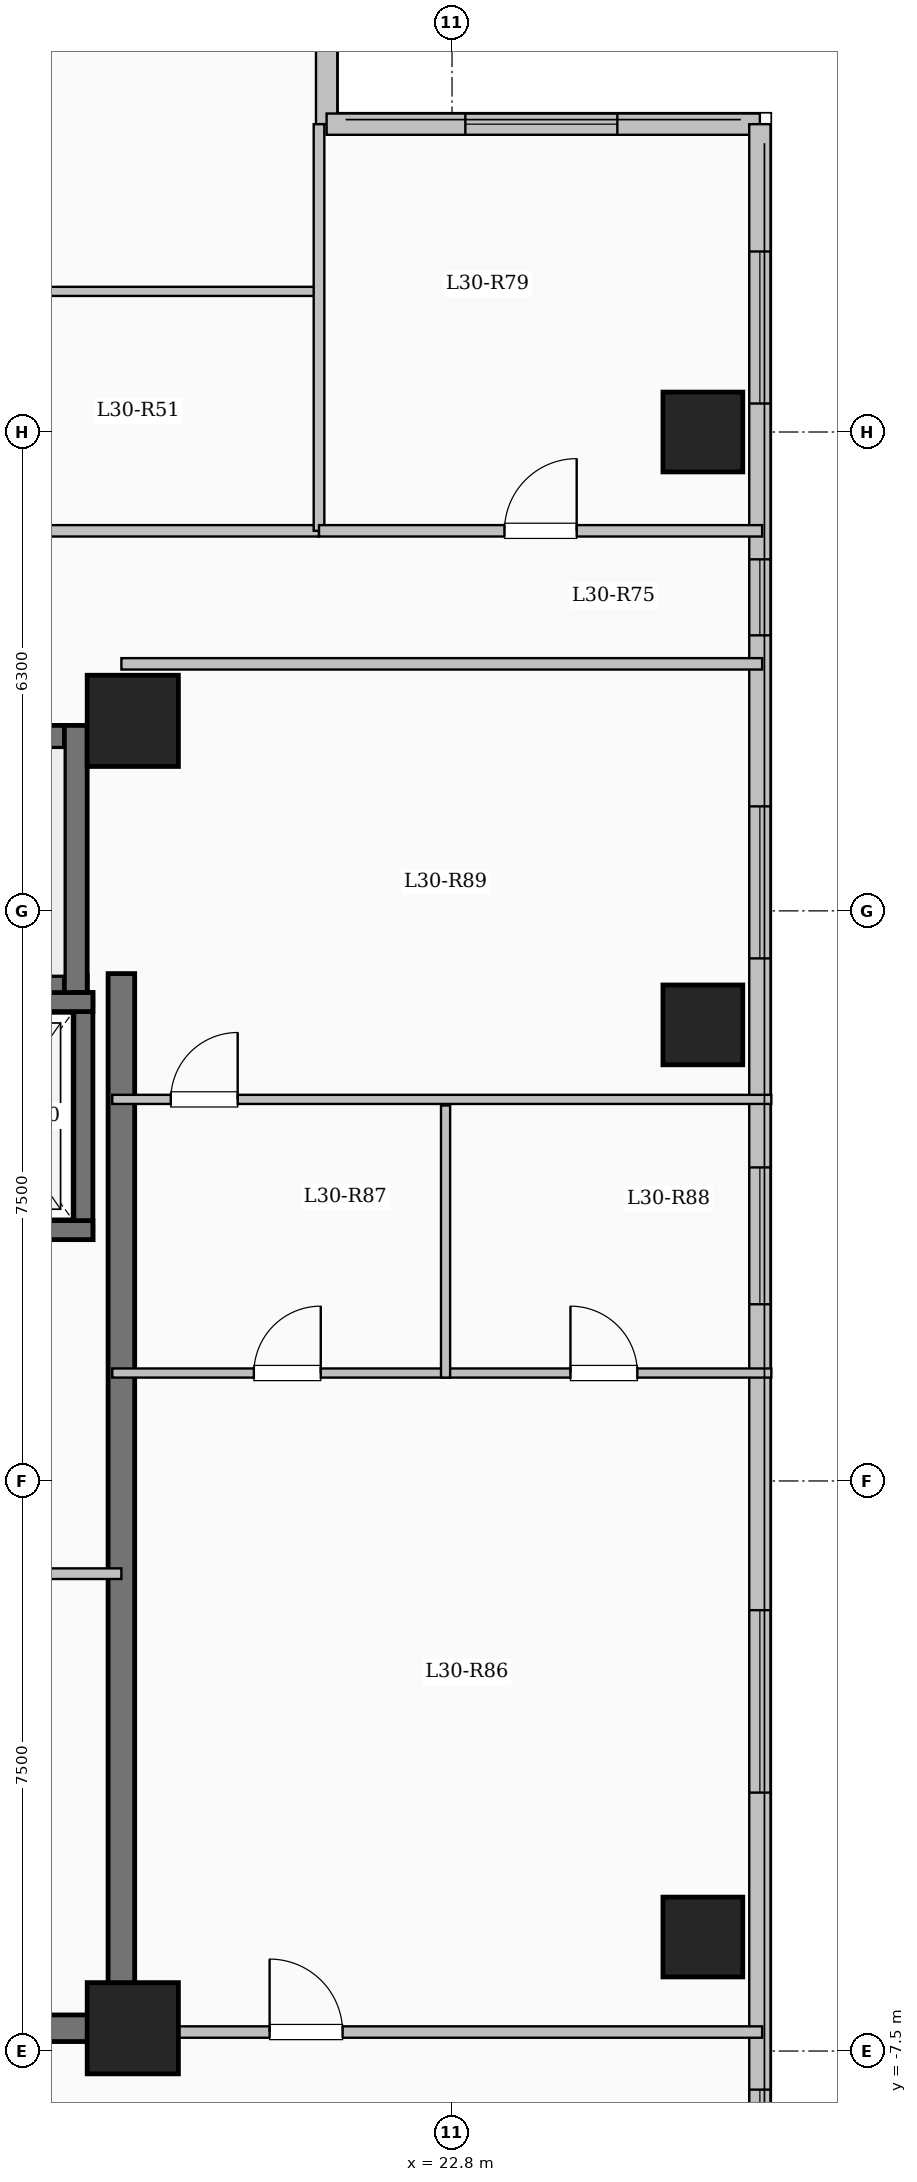
"""IFC4 building model, lengths in metres.
Left out: names, types, materials, properties, quantities, classifications, styles, units other than length and angle.
Written with IfcOpenShell. Run it as: python <this file> out.ifc"""

import sys

from ifc_helpers import new_model, si_unit, direction, frame, frame_2d, origin, origin_2d, place, context, subcontext, project, spatial, rectangle, extrude, element, fill, save


model = new_model("IFC4")
c1 = context("Model", 3, precision=1e-05, world=origin(), true_north=direction((0.0, 1.0)))
c2 = subcontext(c1, "Body", "Model", "MODEL_VIEW")
j1 = project(units=[si_unit("LENGTHUNIT", "METRE"), si_unit("PLANEANGLEUNIT", "RADIAN")], contexts=[c1])
p1 = place(None, origin())
s1 = spatial("IfcSite", under=j1, at=p1, CompositionType="ELEMENT")
p2 = place(p1, origin())
s2 = spatial("IfcBuilding", under=s1, at=p2, CompositionType="ELEMENT")
p3 = place(p2, frame((0.0, 0.0, 111.8)))
s3 = spatial("IfcBuildingStorey", under=s2, at=p3, CompositionType="ELEMENT", Elevation=111.8)
for number, where, z_axis, x_axis in (
    (1, (18.6, -7.2, 0.0), (0.0, 0.0, 1.0), (1.0, 0.0, 0.0)),
    (2, (18.6, 10.0, 0.0), (0.0, 0.0, 1.0), (1.0, 0.0, 0.0)),
):
    element("IfcColumn", number, at=place(p3, frame(where, z_axis=z_axis, x_axis=x_axis)), inside=s3, PredefinedType="COLUMN", context=c2, shape_type="SweptSolid", body=[
        extrude(rectangle(XDim=1.2, YDim=1.2, at=origin_2d()), origin(), (0.0, 0.0, 1.0), 3.35),
    ])
for number, where, z_axis, x_axis in (
    (3, (26.1, -6.0, 0.0), (0.0, 0.0, 1.0), (1.0, 0.0, 0.0)),
    (4, (26.1, 6.0, 0.0), (0.0, 0.0, 1.0), (1.0, 0.0, 0.0)),
    (5, (26.1, 13.8, 0.0), (0.0, 0.0, 1.0), (1.0, 0.0, 0.0)),
):
    element("IfcColumn", number, at=place(p3, frame(where, z_axis=z_axis, x_axis=x_axis)), inside=s3, PredefinedType="COLUMN", context=c2, shape_type="SweptSolid", body=[
        extrude(rectangle(XDim=1.05, YDim=1.05, at=origin_2d()), origin(), (0.0, 0.0, 1.0), 3.35),
    ])
p4 = place(p3, frame((21.15, 22.05, 0.0), z_axis=(0.0, 0.0, 1.0), x_axis=(0.0, -1.0, 0.0)))
e6 = element("IfcWall", 6, at=p4, inside=s3, PredefinedType="SOLIDWALL", context=c2, shape_type="SweptSolid", body=[
    extrude(rectangle(XDim=4.2, YDim=0.28, at=frame_2d((2.1, 0.0))), origin(), (0.0, 0.0, 1.0), 3.1),
])
p5 = place(p4, frame((1.218, 0.0, 0.9)))
e7 = element("IfcOpeningElement", 7, at=p5, cuts=e6, PredefinedType="OPENING", context=c2, shape_type="SweptSolid", body=[
    extrude(rectangle(XDim=1.8, YDim=1.65, at=frame_2d((0.9, 0.825))), frame((0.0, 0.15, 0.0), z_axis=(0.0, -1.0, 0.0), x_axis=(1.0, 0.0, 0.0)), (0.0, 0.0, 1.0), 0.3),
])
p6 = place(p3, frame((21.15, 17.85, 0.0), z_axis=(0.0, 0.0, 1.0), x_axis=(1.0, 0.0, 0.0)))
e8 = element("IfcWall", 8, at=p6, inside=s3, PredefinedType="SOLIDWALL", context=c2, shape_type="SweptSolid", body=[
    extrude(rectangle(XDim=5.7, YDim=0.28, at=frame_2d((2.85, 0.0))), origin(), (0.0, 0.0, 1.0), 3.1),
])
p7 = place(p6, frame((1.825, 0.0, 0.9)))
e9 = element("IfcOpeningElement", 9, at=p7, cuts=e8, PredefinedType="OPENING", context=c2, shape_type="SweptSolid", body=[
    extrude(rectangle(XDim=2.0, YDim=1.7, at=frame_2d((1.0, 0.85))), frame((0.0, 0.15, 0.0), z_axis=(0.0, -1.0, 0.0), x_axis=(1.0, 0.0, 0.0)), (0.0, 0.0, 1.0), 0.3),
])
p8 = place(p3, frame((26.85, 17.85, 0.0), z_axis=(0.0, 0.0, 1.0), x_axis=(0.0, -1.0, 0.0)))
e10 = element("IfcWall", 10, at=p8, inside=s3, PredefinedType="SOLIDWALL", context=c2, shape_type="SweptSolid", body=[
    extrude(rectangle(XDim=35.7, YDim=0.28, at=frame_2d((17.85, 0.0))), origin(), (0.0, 0.0, 1.0), 3.1),
])
p9 = place(p8, frame((1.675, 0.0, 0.9)))
e11 = element("IfcOpeningElement", 11, at=p9, cuts=e10, PredefinedType="OPENING", context=c2, shape_type="SweptSolid", body=[
    extrude(rectangle(XDim=2.0, YDim=1.7, at=frame_2d((1.0, 0.85))), frame((0.0, 0.15, 0.0), z_axis=(0.0, -1.0, 0.0), x_axis=(1.0, 0.0, 0.0)), (0.0, 0.0, 1.0), 0.3),
])
p10 = place(p8, frame((5.725, 0.0, 0.95)))
e12 = element("IfcOpeningElement", 12, at=p10, cuts=e10, PredefinedType="OPENING", context=c2, shape_type="SweptSolid", body=[
    extrude(rectangle(XDim=1.0, YDim=1.5, at=frame_2d((0.5, 0.75))), frame((0.0, 0.15, 0.0), z_axis=(0.0, -1.0, 0.0), x_axis=(1.0, 0.0, 0.0)), (0.0, 0.0, 1.0), 0.3),
])
p11 = place(p8, frame((8.975, 0.0, 0.9)))
e13 = element("IfcOpeningElement", 13, at=p11, cuts=e10, PredefinedType="OPENING", context=c2, shape_type="SweptSolid", body=[
    extrude(rectangle(XDim=2.0, YDim=1.7, at=frame_2d((1.0, 0.85))), frame((0.0, 0.15, 0.0), z_axis=(0.0, -1.0, 0.0), x_axis=(1.0, 0.0, 0.0)), (0.0, 0.0, 1.0), 0.3),
])
p12 = place(p8, frame((13.725, 0.0, 0.9)))
e14 = element("IfcOpeningElement", 14, at=p12, cuts=e10, PredefinedType="OPENING", context=c2, shape_type="SweptSolid", body=[
    extrude(rectangle(XDim=1.8, YDim=1.65, at=frame_2d((0.9, 0.825))), frame((0.0, 0.15, 0.0), z_axis=(0.0, -1.0, 0.0), x_axis=(1.0, 0.0, 0.0)), (0.0, 0.0, 1.0), 0.3),
])
p13 = place(p8, frame((19.55, 0.0, 0.9)))
e15 = element("IfcOpeningElement", 15, at=p13, cuts=e10, PredefinedType="OPENING", context=c2, shape_type="SweptSolid", body=[
    extrude(rectangle(XDim=2.4, YDim=1.8, at=frame_2d((1.2, 0.9))), frame((0.0, 0.15, 0.0), z_axis=(0.0, -1.0, 0.0), x_axis=(1.0, 0.0, 0.0)), (0.0, 0.0, 1.0), 0.3),
])
p14 = place(p8, frame((25.857, 0.0, 0.9)))
e16 = element("IfcOpeningElement", 16, at=p14, cuts=e10, PredefinedType="OPENING", context=c2, shape_type="SweptSolid", body=[
    extrude(rectangle(XDim=1.5, YDim=1.65, at=frame_2d((0.75, 0.825))), frame((0.0, 0.15, 0.0), z_axis=(0.0, -1.0, 0.0), x_axis=(1.0, 0.0, 0.0)), (0.0, 0.0, 1.0), 0.3),
])
p15 = place(p8, frame((30.75, 0.0, 0.9)))
e17 = element("IfcOpeningElement", 17, at=p15, cuts=e10, PredefinedType="OPENING", context=c2, shape_type="SweptSolid", body=[
    extrude(rectangle(XDim=2.4, YDim=1.8, at=frame_2d((1.2, 0.9))), frame((0.0, 0.15, 0.0), z_axis=(0.0, -1.0, 0.0), x_axis=(1.0, 0.0, 0.0)), (0.0, 0.0, 1.0), 0.3),
])
p16 = place(p3, frame((10.0, 9.79, 0.0), z_axis=(0.0, 0.0, 1.0), x_axis=(1.0, 0.0, 0.0)))
e18 = element("IfcWall", 18, at=p16, inside=s3, PredefinedType="SHEAR", context=c2, shape_type="SweptSolid", body=[
    extrude(rectangle(XDim=8.0, YDim=0.3, at=frame_2d((4.0, 0.0))), origin(), (0.0, 0.0, 1.0), 3.35),
])
p17 = place(p3, frame((10.0, 6.5, 0.0), z_axis=(0.0, 0.0, 1.0), x_axis=(1.0, 0.0, 0.0)))
e19 = element("IfcWall", 19, at=p17, inside=s3, PredefinedType="SHEAR", context=c2, shape_type="SweptSolid", body=[
    extrude(rectangle(XDim=8.0, YDim=0.3, at=frame_2d((4.0, 0.0))), origin(), (0.0, 0.0, 1.0), 3.35),
])
p18 = place(p17, frame((0.55, 0.0, 0.0)))
e20 = element("IfcOpeningElement", 20, at=p18, cuts=e19, PredefinedType="OPENING", context=c2, shape_type="SweptSolid", body=[
    extrude(rectangle(XDim=1.0, YDim=2.15, at=frame_2d((0.5, 1.075))), frame((0.0, 0.16, 0.0), z_axis=(0.0, -1.0, 0.0), x_axis=(1.0, 0.0, 0.0)), (0.0, 0.0, 1.0), 0.32),
])
p19 = place(p3, frame((17.85, 6.35, 0.0), z_axis=(0.0, 0.0, 1.0), x_axis=(0.0, 1.0, 0.0)))
e21 = element("IfcWall", 21, at=p19, inside=s3, PredefinedType="SHEAR", context=c2, shape_type="SweptSolid", body=[
    extrude(rectangle(XDim=3.59, YDim=0.3, at=frame_2d((1.795, 0.0))), origin(), (0.0, 0.0, 1.0), 3.35),
])
p20 = place(p3, frame((17.95, 3.175, 0.0), z_axis=(0.0, 0.0, 1.0), x_axis=(0.0, 1.0, 0.0)))
e22 = element("IfcWall", 22, at=p20, inside=s3, PredefinedType="SHEAR", context=c2, shape_type="SweptSolid", body=[
    extrude(rectangle(XDim=3.25, YDim=0.25, at=frame_2d((1.625, 0.0))), origin(), (0.0, 0.0, 1.0), 3.35),
])
for number, where, z_axis, x_axis in (
    (23, (15.525, 3.3, 0.0), (0.0, 0.0, 1.0), (1.0, 0.0, 0.0)),
    (24, (15.525, 6.3, 0.0), (0.0, 0.0, 1.0), (1.0, 0.0, 0.0)),
):
    element("IfcWall", number, at=place(p3, frame(where, z_axis=z_axis, x_axis=x_axis)), inside=s3, PredefinedType="SHEAR", context=c2, shape_type="SweptSolid", body=[
        extrude(rectangle(XDim=2.55, YDim=0.25, at=frame_2d((1.275, 0.0))), origin(), (0.0, 0.0, 1.0), 3.35),
    ])
p21 = place(p3, frame((18.45, -7.375, 0.0), z_axis=(0.0, 0.0, 1.0), x_axis=(0.0, 1.0, 0.0)))
e25 = element("IfcWall", 25, at=p21, inside=s3, PredefinedType="SHEAR", context=c2, shape_type="SweptSolid", body=[
    extrude(rectangle(XDim=14.05, YDim=0.35, at=frame_2d((7.025, 0.0))), origin(), (0.0, 0.0, 1.0), 3.35),
])
p22 = place(p3, frame((10.075, -7.2, 0.0), z_axis=(0.0, 0.0, 1.0), x_axis=(1.0, 0.0, 0.0)))
e26 = element("IfcWall", 26, at=p22, inside=s3, PredefinedType="SHEAR", context=c2, shape_type="SweptSolid", body=[
    extrude(rectangle(XDim=8.55, YDim=0.35, at=frame_2d((4.275, 0.0))), origin(), (0.0, 0.0, 1.0), 3.35),
])
p23 = place(p3, frame((15.4, -1.22, 0.0), z_axis=(0.0, 0.0, 1.0), x_axis=(1.0, 0.0, 0.0)))
e27 = element("IfcWall", 27, at=p23, inside=s3, PredefinedType="PARTITIONING", context=c2, shape_type="SweptSolid", body=[
    extrude(rectangle(XDim=3.05, YDim=0.14, at=frame_2d((1.525, 0.0))), origin(), (0.0, 0.0, 1.0), 3.1),
])
p24 = place(p23, frame((1.05, 0.0, 0.0)))
e28 = element("IfcOpeningElement", 28, at=p24, cuts=e27, PredefinedType="OPENING", context=c2, shape_type="SweptSolid", body=[
    extrude(rectangle(XDim=0.9, YDim=2.08, at=frame_2d((0.45, 1.04))), frame((0.0, 0.08, 0.0), z_axis=(0.0, -1.0, 0.0), x_axis=(1.0, 0.0, 0.0)), (0.0, 0.0, 1.0), 0.16),
])
p25 = place(p3, frame((3.85, 12.5, 0.0), z_axis=(0.0, 0.0, 1.0), x_axis=(1.0, 0.0, 0.0)))
e29 = element("IfcWall", 29, at=p25, inside=s3, PredefinedType="PARTITIONING", context=c2, shape_type="SweptSolid", body=[
    extrude(rectangle(XDim=17.2, YDim=0.15, at=frame_2d((8.6, 0.0))), origin(), (0.0, 0.0, 1.0), 3.1),
])
p26 = place(p25, frame((1.3, 0.0, 0.0)))
e30 = element("IfcOpeningElement", 30, at=p26, cuts=e29, PredefinedType="OPENING", context=c2, shape_type="SweptSolid", body=[
    extrude(rectangle(XDim=0.96, YDim=2.15, at=frame_2d((0.48, 1.075))), frame((0.0, 0.085, 0.0), z_axis=(0.0, -1.0, 0.0), x_axis=(1.0, 0.0, 0.0)), (0.0, 0.0, 1.0), 0.17),
])
p27 = place(p25, frame((8.06, 0.0, 0.0)))
e31 = element("IfcOpeningElement", 31, at=p27, cuts=e29, PredefinedType="OPENING", context=c2, shape_type="SweptSolid", body=[
    extrude(rectangle(XDim=0.96, YDim=2.15, at=frame_2d((0.48, 1.075))), frame((0.0, 0.085, 0.0), z_axis=(0.0, -1.0, 0.0), x_axis=(1.0, 0.0, 0.0)), (0.0, 0.0, 1.0), 0.17),
])
p28 = place(p3, frame((16.23, 15.65, 0.0), z_axis=(0.0, 0.0, 1.0), x_axis=(1.0, 0.0, 0.0)))
e32 = element("IfcWall", 32, at=p28, inside=s3, PredefinedType="PARTITIONING", context=c2, shape_type="SweptSolid", body=[
    extrude(rectangle(XDim=4.88, YDim=0.12, at=frame_2d((2.44, 0.0))), origin(), (0.0, 0.0, 1.0), 3.1),
])
p29 = place(p3, frame((18.45, -7.25, 0.0), z_axis=(0.0, 0.0, 1.0), x_axis=(1.0, 0.0, 0.0)))
e33 = element("IfcWall", 33, at=p29, inside=s3, PredefinedType="PARTITIONING", context=c2, shape_type="SweptSolid", body=[
    extrude(rectangle(XDim=8.43, YDim=0.15, at=frame_2d((4.215, 0.0))), origin(), (0.0, 0.0, 1.0), 3.1),
])
p30 = place(p29, frame((1.95, 0.0, 0.0)))
e34 = element("IfcOpeningElement", 34, at=p30, cuts=e33, PredefinedType="OPENING", context=c2, shape_type="SweptSolid", body=[
    extrude(rectangle(XDim=0.96, YDim=2.15, at=frame_2d((0.48, 1.075))), frame((0.0, 0.085, 0.0), z_axis=(0.0, -1.0, 0.0), x_axis=(1.0, 0.0, 0.0)), (0.0, 0.0, 1.0), 0.17),
])
p31 = place(p3, frame((18.45, 10.75, 0.0), z_axis=(0.0, 0.0, 1.0), x_axis=(1.0, 0.0, 0.0)))
e35 = element("IfcWall", 35, at=p31, inside=s3, PredefinedType="PARTITIONING", context=c2, shape_type="SweptSolid", body=[
    extrude(rectangle(XDim=8.43, YDim=0.15, at=frame_2d((4.215, 0.0))), origin(), (0.0, 0.0, 1.0), 3.1),
])
p32 = place(p3, frame((21.05, 12.5, 0.0), z_axis=(0.0, 0.0, 1.0), x_axis=(0.0, 1.0, 0.0)))
e36 = element("IfcWall", 36, at=p32, inside=s3, PredefinedType="PARTITIONING", context=c2, shape_type="SweptSolid", body=[
    extrude(rectangle(XDim=5.35, YDim=0.14, at=frame_2d((2.675, 0.0))), origin(), (0.0, 0.0, 1.0), 3.1),
])
p33 = place(p3, frame((21.05, 12.5, 0.0), z_axis=(0.0, 0.0, 1.0), x_axis=(1.0, 0.0, 0.0)))
e37 = element("IfcWall", 37, at=p33, inside=s3, PredefinedType="PARTITIONING", context=c2, shape_type="SweptSolid", body=[
    extrude(rectangle(XDim=5.83, YDim=0.15, at=frame_2d((2.915, 0.0))), origin(), (0.0, 0.0, 1.0), 3.1),
])
p34 = place(p33, frame((2.44, 0.0, 0.0)))
e38 = element("IfcOpeningElement", 38, at=p34, cuts=e37, PredefinedType="OPENING", context=c2, shape_type="SweptSolid", body=[
    extrude(rectangle(XDim=0.95, YDim=2.15, at=frame_2d((0.475, 1.075))), frame((0.0, 0.085, 0.0), z_axis=(0.0, -1.0, 0.0), x_axis=(1.0, 0.0, 0.0)), (0.0, 0.0, 1.0), 0.17),
])
p35 = place(p3, frame((18.33, 1.42, 0.0), z_axis=(0.0, 0.0, 1.0), x_axis=(1.0, 0.0, 0.0)))
e39 = element("IfcWall", 39, at=p35, inside=s3, PredefinedType="PARTITIONING", context=c2, shape_type="SweptSolid", body=[
    extrude(rectangle(XDim=8.67, YDim=0.12, at=frame_2d((4.335, 0.0))), origin(), (0.0, 0.0, 1.0), 3.1),
])
p36 = place(p35, frame((1.863, 0.0, 0.0)))
e40 = element("IfcOpeningElement", 40, at=p36, cuts=e39, PredefinedType="OPENING", context=c2, shape_type="SweptSolid", body=[
    extrude(rectangle(XDim=0.88, YDim=2.1, at=frame_2d((0.44, 1.05))), frame((0.0, 0.07, 0.0), z_axis=(0.0, -1.0, 0.0), x_axis=(1.0, 0.0, 0.0)), (0.0, 0.0, 1.0), 0.14),
])
p37 = place(p35, frame((6.028, 0.0, 0.0)))
e41 = element("IfcOpeningElement", 41, at=p37, cuts=e39, PredefinedType="OPENING", context=c2, shape_type="SweptSolid", body=[
    extrude(rectangle(XDim=0.88, YDim=2.1, at=frame_2d((0.44, 1.05))), frame((0.0, 0.07, 0.0), z_axis=(0.0, -1.0, 0.0), x_axis=(1.0, 0.0, 0.0)), (0.0, 0.0, 1.0), 0.14),
])
p38 = place(p3, frame((18.33, 5.02, 0.0), z_axis=(0.0, 0.0, 1.0), x_axis=(1.0, 0.0, 0.0)))
e42 = element("IfcWall", 42, at=p38, inside=s3, PredefinedType="PARTITIONING", context=c2, shape_type="SweptSolid", body=[
    extrude(rectangle(XDim=8.67, YDim=0.12, at=frame_2d((4.335, 0.0))), origin(), (0.0, 0.0, 1.0), 3.1),
])
p39 = place(p38, frame((0.77, 0.0, 0.0)))
e43 = element("IfcOpeningElement", 43, at=p39, cuts=e42, PredefinedType="OPENING", context=c2, shape_type="SweptSolid", body=[
    extrude(rectangle(XDim=0.88, YDim=2.1, at=frame_2d((0.44, 1.05))), frame((0.0, 0.07, 0.0), z_axis=(0.0, -1.0, 0.0), x_axis=(1.0, 0.0, 0.0)), (0.0, 0.0, 1.0), 0.14),
])
p40 = place(p3, frame((22.715, 1.36, 0.0), z_axis=(0.0, 0.0, 1.0), x_axis=(0.0, 1.0, 0.0)))
e44 = element("IfcWall", 44, at=p40, inside=s3, PredefinedType="PARTITIONING", context=c2, shape_type="SweptSolid", body=[
    extrude(rectangle(XDim=3.58, YDim=0.12, at=frame_2d((1.79, 0.0))), origin(), (0.0, 0.0, 1.0), 3.1),
])
p41 = place(p7, origin())
e45 = element("IfcWindow", 45, at=p41, inside=s3, PartitioningType="SINGLE_PANEL", PredefinedType="WINDOW", context=c2, shape_type="SweptSolid", body=[
    extrude(rectangle(XDim=2.0, YDim=1.7, at=frame_2d((1.0, 0.85))), frame((0.0, 0.03, 0.0), z_axis=(0.0, -1.0, 0.0), x_axis=(1.0, 0.0, 0.0)), (0.0, 0.0, 1.0), 0.06),
])
fill(e9, e45)
p42 = place(p9, origin())
e46 = element("IfcWindow", 46, at=p42, inside=s3, PartitioningType="SINGLE_PANEL", PredefinedType="WINDOW", context=c2, shape_type="SweptSolid", body=[
    extrude(rectangle(XDim=2.0, YDim=1.7, at=frame_2d((1.0, 0.85))), frame((0.0, 0.03, 0.0), z_axis=(0.0, -1.0, 0.0), x_axis=(1.0, 0.0, 0.0)), (0.0, 0.0, 1.0), 0.06),
])
fill(e11, e46)
p43 = place(p10, origin())
e47 = element("IfcWindow", 47, at=p43, inside=s3, PartitioningType="SINGLE_PANEL", PredefinedType="WINDOW", context=c2, shape_type="SweptSolid", body=[
    extrude(rectangle(XDim=1.0, YDim=1.5, at=frame_2d((0.5, 0.75))), frame((0.0, 0.03, 0.0), z_axis=(0.0, -1.0, 0.0), x_axis=(1.0, 0.0, 0.0)), (0.0, 0.0, 1.0), 0.06),
])
fill(e12, e47)
p44 = place(p11, origin())
e48 = element("IfcWindow", 48, at=p44, inside=s3, PartitioningType="SINGLE_PANEL", PredefinedType="WINDOW", context=c2, shape_type="SweptSolid", body=[
    extrude(rectangle(XDim=2.0, YDim=1.7, at=frame_2d((1.0, 0.85))), frame((0.0, 0.03, 0.0), z_axis=(0.0, -1.0, 0.0), x_axis=(1.0, 0.0, 0.0)), (0.0, 0.0, 1.0), 0.06),
])
fill(e13, e48)
p45 = place(p12, origin())
e49 = element("IfcWindow", 49, at=p45, inside=s3, PartitioningType="SINGLE_PANEL", PredefinedType="WINDOW", context=c2, shape_type="SweptSolid", body=[
    extrude(rectangle(XDim=1.8, YDim=1.65, at=frame_2d((0.9, 0.825))), frame((0.0, 0.03, 0.0), z_axis=(0.0, -1.0, 0.0), x_axis=(1.0, 0.0, 0.0)), (0.0, 0.0, 1.0), 0.06),
])
fill(e14, e49)
p46 = place(p13, origin())
e50 = element("IfcWindow", 50, at=p46, inside=s3, PartitioningType="SINGLE_PANEL", PredefinedType="WINDOW", context=c2, shape_type="SweptSolid", body=[
    extrude(rectangle(XDim=2.4, YDim=1.8, at=frame_2d((1.2, 0.9))), frame((0.0, 0.03, 0.0), z_axis=(0.0, -1.0, 0.0), x_axis=(1.0, 0.0, 0.0)), (0.0, 0.0, 1.0), 0.06),
])
fill(e15, e50)
p47 = place(p14, origin())
e51 = element("IfcWindow", 51, at=p47, inside=s3, PartitioningType="SINGLE_PANEL", PredefinedType="WINDOW", context=c2, shape_type="SweptSolid", body=[
    extrude(rectangle(XDim=1.5, YDim=1.65, at=frame_2d((0.75, 0.825))), frame((0.0, 0.03, 0.0), z_axis=(0.0, -1.0, 0.0), x_axis=(1.0, 0.0, 0.0)), (0.0, 0.0, 1.0), 0.06),
])
fill(e16, e51)
p48 = place(p34, origin())
e52 = element("IfcDoor", 52, at=p48, inside=s3, OperationType="SINGLE_SWING_RIGHT", PredefinedType="DOOR", context=c2, shape_type="SweptSolid", body=[
    extrude(rectangle(XDim=0.95, YDim=2.15, at=frame_2d((0.475, 1.075))), frame((0.0, 0.025, 0.0), z_axis=(0.0, -1.0, 0.0), x_axis=(1.0, 0.0, 0.0)), (0.0, 0.0, 1.0), 0.05),
])
fill(e38, e52)
p49 = place(p30, origin())
e53 = element("IfcDoor", 53, at=p49, inside=s3, OperationType="SINGLE_SWING_LEFT", PredefinedType="DOOR", context=c2, shape_type="SweptSolid", body=[
    extrude(rectangle(XDim=0.96, YDim=2.15, at=frame_2d((0.48, 1.075))), frame((0.0, 0.025, 0.0), z_axis=(0.0, -1.0, 0.0), x_axis=(1.0, 0.0, 0.0)), (0.0, 0.0, 1.0), 0.05),
])
fill(e34, e53)
p50 = place(p36, origin())
e54 = element("IfcDoor", 54, at=p50, inside=s3, OperationType="SINGLE_SWING_RIGHT", PredefinedType="DOOR", context=c2, shape_type="SweptSolid", body=[
    extrude(rectangle(XDim=0.88, YDim=2.1, at=frame_2d((0.44, 1.05))), frame((0.0, 0.025, 0.0), z_axis=(0.0, -1.0, 0.0), x_axis=(1.0, 0.0, 0.0)), (0.0, 0.0, 1.0), 0.05),
])
fill(e40, e54)
p51 = place(p37, origin())
e55 = element("IfcDoor", 55, at=p51, inside=s3, OperationType="SINGLE_SWING_LEFT", PredefinedType="DOOR", context=c2, shape_type="SweptSolid", body=[
    extrude(rectangle(XDim=0.88, YDim=2.1, at=frame_2d((0.44, 1.05))), frame((0.0, 0.025, 0.0), z_axis=(0.0, -1.0, 0.0), x_axis=(1.0, 0.0, 0.0)), (0.0, 0.0, 1.0), 0.05),
])
fill(e41, e55)
p52 = place(p39, origin())
e56 = element("IfcDoor", 56, at=p52, inside=s3, OperationType="SINGLE_SWING_RIGHT", PredefinedType="DOOR", context=c2, shape_type="SweptSolid", body=[
    extrude(rectangle(XDim=0.88, YDim=2.1, at=frame_2d((0.44, 1.05))), frame((0.0, 0.025, 0.0), z_axis=(0.0, -1.0, 0.0), x_axis=(1.0, 0.0, 0.0)), (0.0, 0.0, 1.0), 0.05),
])
fill(e43, e56)
save(model, sys.argv[1])
